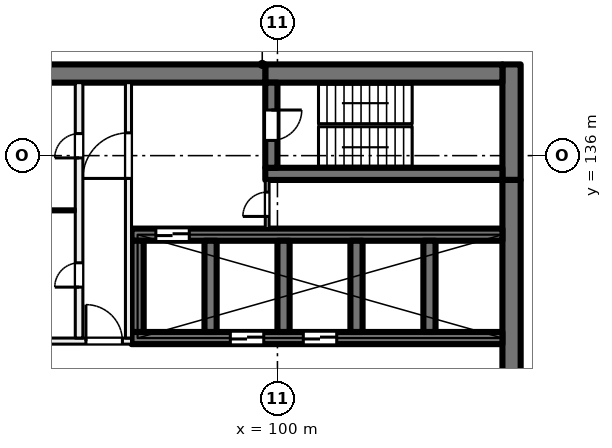
"""IFC4 building model, lengths in metres.
Left out: names, types, materials, properties, quantities, classifications, styles, units other than length and angle.
Written with IfcOpenShell. Run it as: python <this file> out.ifc"""

import sys

from ifc_helpers import new_model, si_unit, direction, frame, frame_2d, origin, place, context, subcontext, project, spatial, rectangle, extrude, element, fill, save


model = new_model("IFC4")
c1 = context("Model", 3, precision=1e-05, world=origin(), true_north=direction((0.0, 1.0)))
c2 = subcontext(c1, "Body", "Model", "MODEL_VIEW")
j1 = project(units=[si_unit("LENGTHUNIT", "METRE"), si_unit("PLANEANGLEUNIT", "RADIAN")], contexts=[c1])
p1 = place(None, origin())
s1 = spatial("IfcSite", under=j1, at=p1, CompositionType="ELEMENT")
p2 = place(p1, origin())
s2 = spatial("IfcBuilding", under=s1, at=p2, CompositionType="ELEMENT")
p3 = place(p2, frame((0.0, 0.0, 39.5)))
s3 = spatial("IfcBuildingStorey", under=s2, at=p3, CompositionType="ELEMENT", Elevation=39.5)
p4 = place(p3, frame((107.7, 139.0, 0.0), z_axis=(0.0, 0.0, 1.0), x_axis=(0.0, -1.0, 0.0)))
e1 = element("IfcWall", 1, at=p4, inside=s3, PredefinedType="SHEAR", context=c2, shape_type="SweptSolid", body=[
    extrude(rectangle(XDim=3.8, YDim=0.6, at=frame_2d((1.9, 0.0))), origin(), (0.0, 0.0, 1.0), 4.0),
])
p5 = place(p3, frame((107.7, 135.2, 0.0), z_axis=(0.0, 0.0, 1.0), x_axis=(0.0, -1.0, 0.0)))
e2 = element("IfcWall", 2, at=p5, inside=s3, PredefinedType="SHEAR", context=c2, shape_type="SweptSolid", body=[
    extrude(rectangle(XDim=14.4, YDim=0.6, at=frame_2d((7.2, 0.0))), origin(), (0.0, 0.0, 1.0), 4.0),
])
p6 = place(p3, frame((107.4, 138.7, 0.0), z_axis=(0.0, 0.0, 1.0), x_axis=(-1.0, 0.0, 0.0)))
e3 = element("IfcWall", 3, at=p6, inside=s3, PredefinedType="SHEAR", context=c2, shape_type="SweptSolid", body=[
    extrude(rectangle(XDim=7.8, YDim=0.6, at=frame_2d((3.9, 0.0))), origin(), (0.0, 0.0, 1.0), 4.0),
])
p7 = place(p3, frame((99.6, 138.7, 0.0), z_axis=(0.0, 0.0, 1.0), x_axis=(-1.0, 0.0, 0.0)))
e4 = element("IfcWall", 4, at=p7, inside=s3, PredefinedType="SHEAR", context=c2, shape_type="SweptSolid", body=[
    extrude(rectangle(XDim=8.9, YDim=0.6, at=frame_2d((4.45, 0.0))), origin(), (0.0, 0.0, 1.0), 4.0),
])
p8 = place(p3, frame((107.4, 135.4, 0.0), z_axis=(0.0, 0.0, 1.0), x_axis=(-1.0, 0.0, 0.0)))
e5 = element("IfcWall", 5, at=p8, inside=s3, PredefinedType="SHEAR", context=c2, shape_type="SweptSolid", body=[
    extrude(rectangle(XDim=7.8, YDim=0.4, at=frame_2d((3.9, 0.0))), origin(), (0.0, 0.0, 1.0), 4.0),
])
p9 = place(p3, frame((99.8, 138.4, 0.0), z_axis=(0.0, 0.0, 1.0), x_axis=(0.0, -1.0, 0.0)))
e6 = element("IfcWall", 6, at=p9, inside=s3, PredefinedType="SHEAR", context=c2, shape_type="SweptSolid", body=[
    extrude(rectangle(XDim=2.8, YDim=0.4, at=frame_2d((1.4, 0.0))), origin(), (0.0, 0.0, 1.0), 4.0),
])
p10 = place(p9, frame((0.9, 0.0, 0.0)))
e7 = element("IfcOpeningElement", 7, at=p10, cuts=e6, PredefinedType="OPENING", context=c2, shape_type="SweptSolid", body=[
    extrude(rectangle(XDim=1.0, YDim=2.1, at=frame_2d((0.5, 1.05))), frame((0.0, 0.21, 0.0), z_axis=(0.0, -1.0, 0.0), x_axis=(1.0, 0.0, 0.0)), (0.0, 0.0, 1.0), 0.42),
])
p11 = place(p3, frame((107.4, 130.0, 0.0), z_axis=(0.0, 0.0, 1.0), x_axis=(-1.0, 0.0, 0.0)))
e8 = element("IfcWall", 8, at=p11, inside=s3, PredefinedType="SHEAR", context=c2, shape_type="SweptSolid", body=[
    extrude(rectangle(XDim=12.2, YDim=0.4, at=frame_2d((6.1, 0.0))), origin(), (0.0, 0.0, 1.0), 4.0),
])
p12 = place(p11, frame((5.45, 0.0, 0.0)))
e9 = element("IfcOpeningElement", 9, at=p12, cuts=e8, PredefinedType="OPENING", context=c2, shape_type="SweptSolid", body=[
    extrude(rectangle(XDim=1.1, YDim=2.1, at=frame_2d((0.55, 1.05))), frame((0.0, 0.21, 0.0), z_axis=(0.0, -1.0, 0.0), x_axis=(1.0, 0.0, 0.0)), (0.0, 0.0, 1.0), 0.42),
])
p13 = place(p11, frame((7.85, 0.0, 0.0)))
e10 = element("IfcOpeningElement", 10, at=p13, cuts=e8, PredefinedType="OPENING", context=c2, shape_type="SweptSolid", body=[
    extrude(rectangle(XDim=1.1, YDim=2.1, at=frame_2d((0.55, 1.05))), frame((0.0, 0.21, 0.0), z_axis=(0.0, -1.0, 0.0), x_axis=(1.0, 0.0, 0.0)), (0.0, 0.0, 1.0), 0.42),
])
p14 = place(p3, frame((107.4, 133.4, 0.0), z_axis=(0.0, 0.0, 1.0), x_axis=(-1.0, 0.0, 0.0)))
e11 = element("IfcWall", 11, at=p14, inside=s3, PredefinedType="SHEAR", context=c2, shape_type="SweptSolid", body=[
    extrude(rectangle(XDim=12.2, YDim=0.4, at=frame_2d((6.1, 0.0))), origin(), (0.0, 0.0, 1.0), 4.0),
])
p15 = place(p14, frame((10.3, 0.0, 0.0)))
e12 = element("IfcOpeningElement", 12, at=p15, cuts=e11, PredefinedType="OPENING", context=c2, shape_type="SweptSolid", body=[
    extrude(rectangle(XDim=1.1, YDim=2.1, at=frame_2d((0.55, 1.05))), frame((0.0, 0.21, 0.0), z_axis=(0.0, -1.0, 0.0), x_axis=(1.0, 0.0, 0.0)), (0.0, 0.0, 1.0), 0.42),
])
for number, where, z_axis, x_axis in (
    (13, (105.0, 133.2, 0.0), (0.0, 0.0, 1.0), (0.0, -1.0, 0.0)),
    (14, (102.6, 133.2, 0.0), (0.0, 0.0, 1.0), (0.0, -1.0, 0.0)),
    (15, (100.2, 133.2, 0.0), (0.0, 0.0, 1.0), (0.0, -1.0, 0.0)),
    (16, (97.8, 133.2, 0.0), (0.0, 0.0, 1.0), (0.0, -1.0, 0.0)),
    (17, (95.4, 133.2, 0.0), (0.0, 0.0, 1.0), (0.0, -1.0, 0.0)),
):
    element("IfcWall", number, at=place(p3, frame(where, z_axis=z_axis, x_axis=x_axis)), inside=s3, PredefinedType="SHEAR", context=c2, shape_type="SweptSolid", body=[
        extrude(rectangle(XDim=3.0, YDim=0.4, at=frame_2d((1.5, 0.0))), origin(), (0.0, 0.0, 1.0), 4.0),
    ])
p16 = place(p3, frame((91.4, 129.9, 0.0), z_axis=(0.0, 0.0, 1.0), x_axis=(1.0, 0.0, 0.0)))
e18 = element("IfcWall", 18, at=p16, inside=s3, PredefinedType="PARTITIONING", context=c2, shape_type="SweptSolid", body=[
    extrude(rectangle(XDim=3.8, YDim=0.2, at=frame_2d((1.9, 0.0))), origin(), (0.0, 0.0, 1.0), 3.625),
])
p17 = place(p16, frame((2.3, 0.0, 0.0)))
e19 = element("IfcOpeningElement", 19, at=p17, cuts=e18, PredefinedType="OPENING", context=c2, shape_type="SweptSolid", body=[
    extrude(rectangle(XDim=1.2, YDim=2.1, at=frame_2d((0.6, 1.05))), frame((0.0, 0.11, 0.0), z_axis=(0.0, -1.0, 0.0), x_axis=(1.0, 0.0, 0.0)), (0.0, 0.0, 1.0), 0.22),
])
p18 = place(p3, frame((95.1, 130.0, 0.0), z_axis=(0.0, 0.0, 1.0), x_axis=(0.0, 1.0, 0.0)))
e20 = element("IfcWall", 20, at=p18, inside=s3, PredefinedType="PARTITIONING", context=c2, shape_type="SweptSolid", body=[
    extrude(rectangle(XDim=8.4, YDim=0.2, at=frame_2d((4.2, 0.0))), origin(), (0.0, 0.0, 1.0), 3.625),
])
p19 = place(p18, frame((5.25, 0.0, 0.0)))
e21 = element("IfcOpeningElement", 21, at=p19, cuts=e20, PredefinedType="OPENING", context=c2, shape_type="SweptSolid", body=[
    extrude(rectangle(XDim=1.5, YDim=2.1, at=frame_2d((0.75, 1.05))), frame((0.0, 0.11, 0.0), z_axis=(0.0, -1.0, 0.0), x_axis=(1.0, 0.0, 0.0)), (0.0, 0.0, 1.0), 0.22),
])
p20 = place(p3, frame((93.475, 130.0, 0.0), z_axis=(0.0, 0.0, 1.0), x_axis=(0.0, 1.0, 0.0)))
e22 = element("IfcWall", 22, at=p20, inside=s3, PredefinedType="PARTITIONING", context=c2, shape_type="SweptSolid", body=[
    extrude(rectangle(XDim=8.4, YDim=0.25, at=frame_2d((4.2, 0.0))), origin(), (0.0, 0.0, 1.0), 3.625),
])
p21 = place(p20, frame((1.675, 0.0, 0.0)))
e23 = element("IfcOpeningElement", 23, at=p21, cuts=e22, PredefinedType="OPENING", context=c2, shape_type="SweptSolid", body=[
    extrude(rectangle(XDim=0.8, YDim=2.1, at=frame_2d((0.4, 1.05))), frame((0.0, 0.135, 0.0), z_axis=(0.0, -1.0, 0.0), x_axis=(1.0, 0.0, 0.0)), (0.0, 0.0, 1.0), 0.27),
])
p22 = place(p20, frame((5.925, 0.0, 0.0)))
e24 = element("IfcOpeningElement", 24, at=p22, cuts=e22, PredefinedType="OPENING", context=c2, shape_type="SweptSolid", body=[
    extrude(rectangle(XDim=0.8, YDim=2.1, at=frame_2d((0.4, 1.05))), frame((0.0, 0.135, 0.0), z_axis=(0.0, -1.0, 0.0), x_axis=(1.0, 0.0, 0.0)), (0.0, 0.0, 1.0), 0.27),
])
p23 = place(p3, frame((99.663, 133.6, 0.0), z_axis=(0.0, 0.0, 1.0), x_axis=(0.0, 1.0, 0.0)))
e25 = element("IfcWall", 25, at=p23, inside=s3, PredefinedType="PARTITIONING", context=c2, shape_type="SweptSolid", body=[
    extrude(rectangle(XDim=1.6, YDim=0.125, at=frame_2d((0.8, 0.0))), origin(), (0.0, 0.0, 1.0), 3.625),
])
p24 = place(p23, frame((0.4, 0.0, 0.0)))
e26 = element("IfcOpeningElement", 26, at=p24, cuts=e25, PredefinedType="OPENING", context=c2, shape_type="SweptSolid", body=[
    extrude(rectangle(XDim=0.8, YDim=2.1, at=frame_2d((0.4, 1.05))), frame((0.0, 0.073, 0.0), z_axis=(0.0, -1.0, 0.0), x_axis=(1.0, 0.0, 0.0)), (0.0, 0.0, 1.0), 0.145),
])
p25 = place(p3, frame((91.4, 134.2, 0.0), z_axis=(0.0, 0.0, 1.0), x_axis=(1.0, 0.0, 0.0)))
e27 = element("IfcWall", 27, at=p25, inside=s3, PredefinedType="PARTITIONING", context=c2, shape_type="SweptSolid", body=[
    extrude(rectangle(XDim=1.95, YDim=0.1, at=frame_2d((0.975, 0.0))), origin(), (0.0, 0.0, 1.0), 3.625),
])
p26 = place(p12, origin())
e28 = element("IfcDoor", 28, at=p26, inside=s3, OperationType="DOUBLE_DOOR_SLIDING", PredefinedType="DOOR", context=c2, shape_type="SweptSolid", body=[
    extrude(rectangle(XDim=1.1, YDim=2.1, at=frame_2d((0.55, 1.05))), frame((0.0, 0.025, 0.0), z_axis=(0.0, -1.0, 0.0), x_axis=(1.0, 0.0, 0.0)), (0.0, 0.0, 1.0), 0.05),
])
fill(e9, e28)
p27 = place(p13, origin())
e29 = element("IfcDoor", 29, at=p27, inside=s3, OperationType="DOUBLE_DOOR_SLIDING", PredefinedType="DOOR", context=c2, shape_type="SweptSolid", body=[
    extrude(rectangle(XDim=1.1, YDim=2.1, at=frame_2d((0.55, 1.05))), frame((0.0, 0.025, 0.0), z_axis=(0.0, -1.0, 0.0), x_axis=(1.0, 0.0, 0.0)), (0.0, 0.0, 1.0), 0.05),
])
fill(e10, e29)
p28 = place(p17, origin())
e30 = element("IfcDoor", 30, at=p28, inside=s3, OperationType="DOUBLE_DOOR_SINGLE_SWING", PredefinedType="DOOR", context=c2, shape_type="SweptSolid", body=[
    extrude(rectangle(XDim=1.2, YDim=2.1, at=frame_2d((0.6, 1.05))), frame((0.0, 0.025, 0.0), z_axis=(0.0, -1.0, 0.0), x_axis=(1.0, 0.0, 0.0)), (0.0, 0.0, 1.0), 0.05),
])
fill(e19, e30)
p29 = place(p19, origin())
e31 = element("IfcDoor", 31, at=p29, inside=s3, OperationType="DOUBLE_DOOR_SINGLE_SWING", PredefinedType="DOOR", context=c2, shape_type="SweptSolid", body=[
    extrude(rectangle(XDim=1.5, YDim=2.1, at=frame_2d((0.75, 1.05))), frame((0.0, 0.025, 0.0), z_axis=(0.0, -1.0, 0.0), x_axis=(1.0, 0.0, 0.0)), (0.0, 0.0, 1.0), 0.05),
])
fill(e21, e31)
p30 = place(p10, origin())
e32 = element("IfcDoor", 32, at=p30, inside=s3, OperationType="SINGLE_SWING_RIGHT", PredefinedType="DOOR", context=c2, shape_type="SweptSolid", body=[
    extrude(rectangle(XDim=1.0, YDim=2.1, at=frame_2d((0.5, 1.05))), frame((0.0, 0.025, 0.0), z_axis=(0.0, -1.0, 0.0), x_axis=(1.0, 0.0, 0.0)), (0.0, 0.0, 1.0), 0.05),
])
fill(e7, e32)
p31 = place(p24, origin())
e33 = element("IfcDoor", 33, at=p31, inside=s3, OperationType="SINGLE_SWING_LEFT", PredefinedType="DOOR", context=c2, shape_type="SweptSolid", body=[
    extrude(rectangle(XDim=0.8, YDim=2.1, at=frame_2d((0.4, 1.05))), frame((0.0, 0.025, 0.0), z_axis=(0.0, -1.0, 0.0), x_axis=(1.0, 0.0, 0.0)), (0.0, 0.0, 1.0), 0.05),
])
fill(e26, e33)
p32 = place(p21, origin())
e34 = element("IfcDoor", 34, at=p32, inside=s3, OperationType="SINGLE_SWING_RIGHT", PredefinedType="DOOR", context=c2, shape_type="SweptSolid", body=[
    extrude(rectangle(XDim=0.8, YDim=2.1, at=frame_2d((0.4, 1.05))), frame((0.0, 0.025, 0.0), z_axis=(0.0, -1.0, 0.0), x_axis=(1.0, 0.0, 0.0)), (0.0, 0.0, 1.0), 0.05),
])
fill(e23, e34)
p33 = place(p22, origin())
e35 = element("IfcDoor", 35, at=p33, inside=s3, OperationType="SINGLE_SWING_LEFT", PredefinedType="DOOR", context=c2, shape_type="SweptSolid", body=[
    extrude(rectangle(XDim=0.8, YDim=2.1, at=frame_2d((0.4, 1.05))), frame((0.0, 0.025, 0.0), z_axis=(0.0, -1.0, 0.0), x_axis=(1.0, 0.0, 0.0)), (0.0, 0.0, 1.0), 0.05),
])
fill(e24, e35)
p34 = place(p15, origin())
e36 = element("IfcDoor", 36, at=p34, inside=s3, OperationType="DOUBLE_DOOR_SLIDING", PredefinedType="DOOR", context=c2, shape_type="SweptSolid", body=[
    extrude(rectangle(XDim=1.1, YDim=2.1, at=frame_2d((0.55, 1.05))), frame((0.0, 0.025, 0.0), z_axis=(0.0, -1.0, 0.0), x_axis=(1.0, 0.0, 0.0)), (0.0, 0.0, 1.0), 0.05),
])
fill(e12, e36)
save(model, sys.argv[1])
